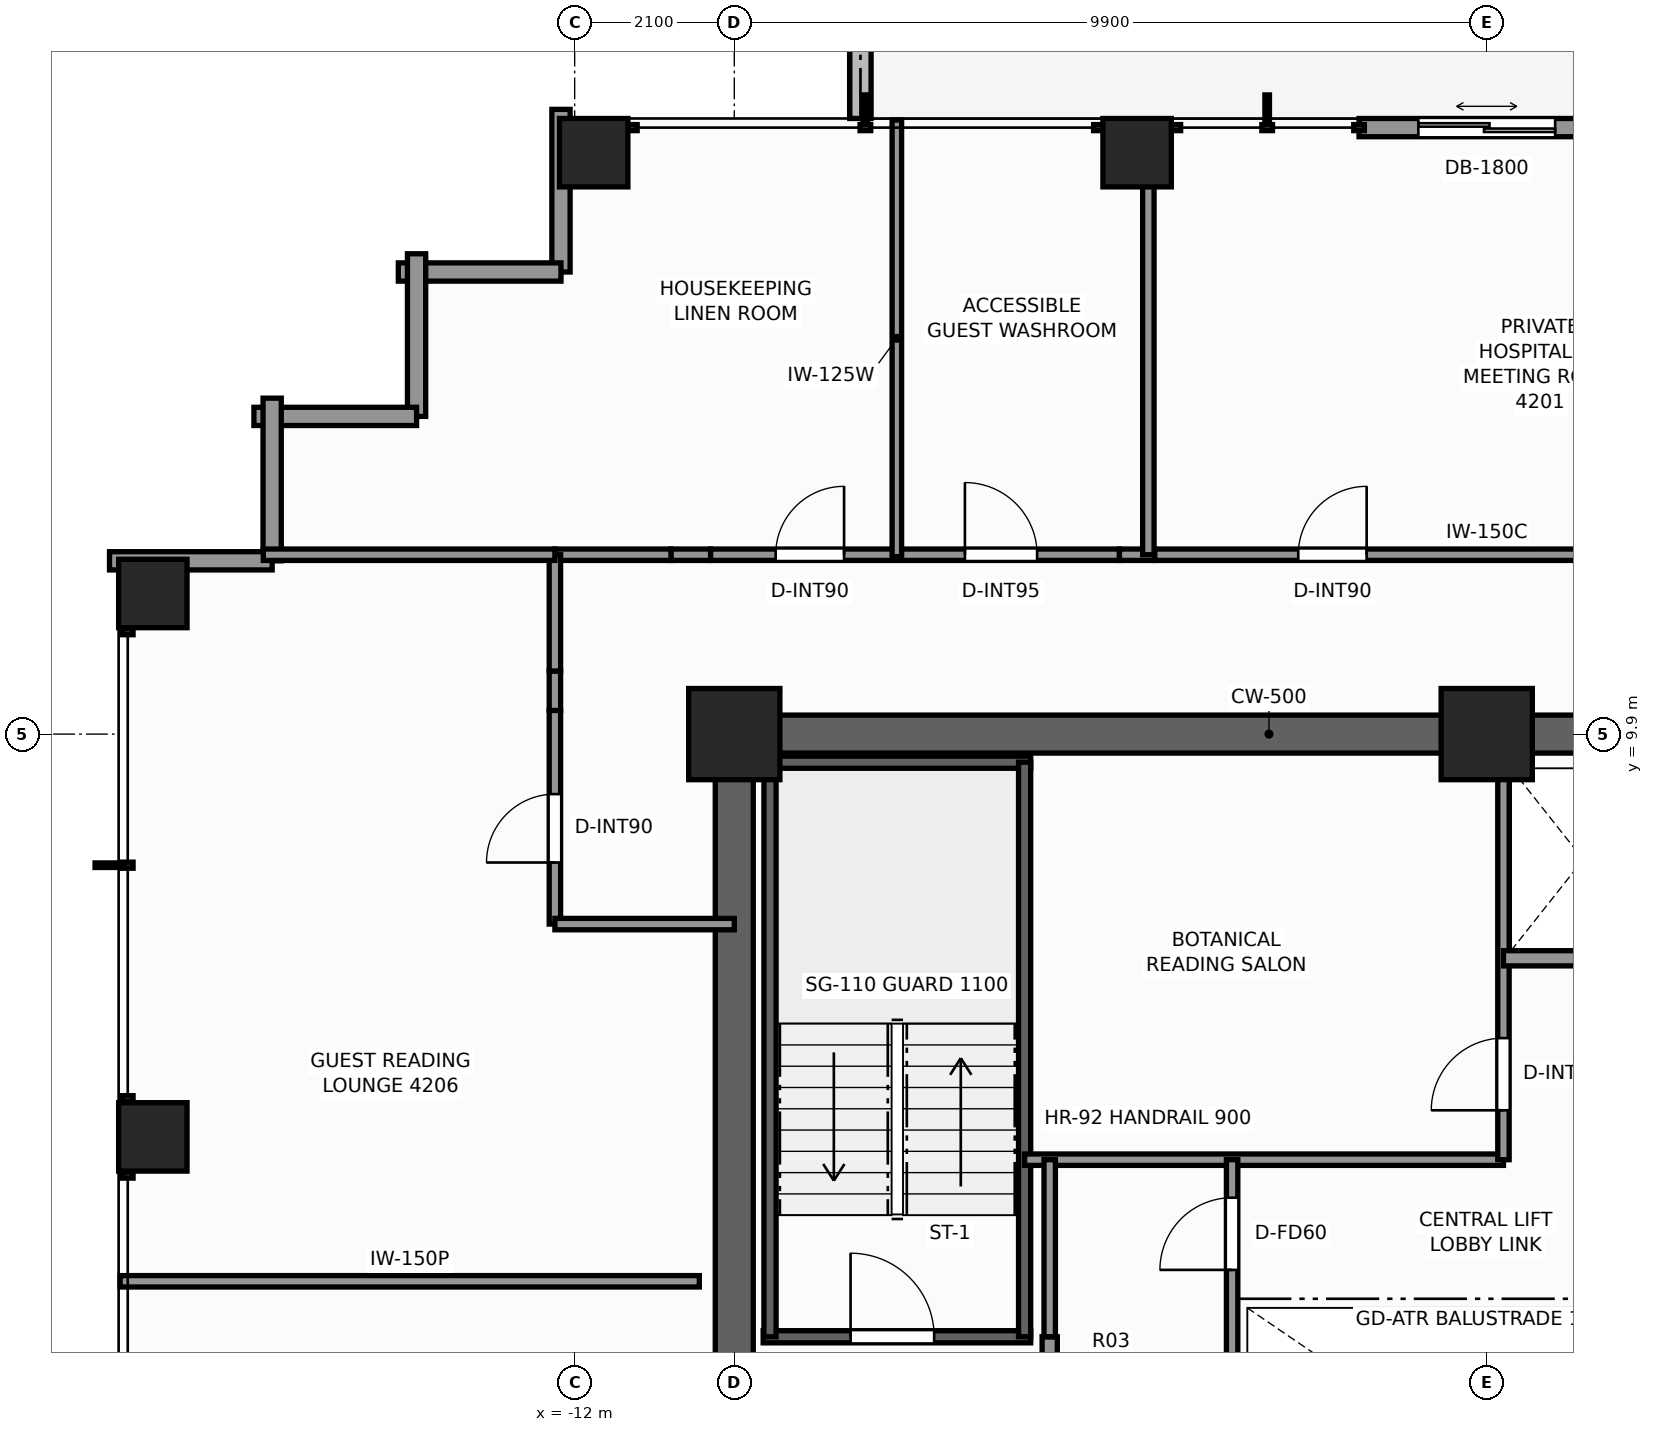
"""IFC4 building model, lengths in metres.
Left out: names, types, materials, properties, quantities, classifications, styles, units other than length and angle.
Written with IfcOpenShell. Run it as: python <this file> out.ifc"""

import sys

from ifc_helpers import new_model, si_unit, direction, frame, frame_2d, origin, origin_2d, place, context, subcontext, project, spatial, rectangle, extrude, element, fill, save


model = new_model("IFC4")
c1 = context("Model", 3, precision=1e-05, world=origin(), true_north=direction((0.0, 1.0)))
c2 = subcontext(c1, "Body", "Model", "MODEL_VIEW")
j1 = project(units=[si_unit("LENGTHUNIT", "METRE"), si_unit("PLANEANGLEUNIT", "RADIAN")], contexts=[c1])
p1 = place(None, origin())
s1 = spatial("IfcSite", under=j1, at=p1, CompositionType="ELEMENT")
p2 = place(p1, origin())
s2 = spatial("IfcBuilding", under=s1, at=p2, CompositionType="ELEMENT")
p3 = place(p2, frame((0.0, 0.0, 144.8)))
s3 = spatial("IfcBuildingStorey", under=s2, at=p3, CompositionType="ELEMENT", Elevation=144.8)
p4 = place(p3, frame((-10.15, 9.9, 0.0), z_axis=(0.0, 0.0, 1.0), x_axis=(1.0, 0.0, 0.0)))
e1 = element("IfcWall", 1, at=p4, inside=s3, PredefinedType="SHEAR", context=c2, shape_type="SweptSolid", body=[
    extrude(rectangle(XDim=14.57, YDim=0.5, at=frame_2d((7.285, 0.0))), origin(), (0.0, 0.0, 1.0), 3.3),
])
p5 = place(p3, frame((-9.9, -3.7, 0.0), z_axis=(0.0, 0.0, 1.0), x_axis=(0.0, 1.0, 0.0)))
e2 = element("IfcWall", 2, at=p5, inside=s3, PredefinedType="SHEAR", context=c2, shape_type="SweptSolid", body=[
    extrude(rectangle(XDim=13.35, YDim=0.5, at=frame_2d((6.675, 0.0))), origin(), (0.0, 0.0, 1.0), 3.3),
])
p6 = place(p5, frame((0.35, 0.0, 0.0)))
e3 = element("IfcOpeningElement", 3, at=p6, cuts=e2, PredefinedType="OPENING", context=c2, shape_type="SweptSolid", body=[
    extrude(rectangle(XDim=1.1, YDim=2.2, at=frame_2d((0.55, 1.1))), frame((0.0, 0.26, 0.0), z_axis=(0.0, -1.0, 0.0), x_axis=(1.0, 0.0, 0.0)), (0.0, 0.0, 1.0), 0.52),
])
for number, where, z_axis, x_axis in (
    (4, (-9.9, 9.9, 0.0), (0.0, 0.0, 1.0), (1.0, 0.0, 0.0)),
    (5, (0.0, 9.9, 0.0), (0.0, 0.0, 1.0), (1.0, 0.0, 0.0)),
):
    element("IfcColumn", number, at=place(p3, frame(where, z_axis=z_axis, x_axis=x_axis)), inside=s3, PredefinedType="COLUMN", context=c2, shape_type="SweptSolid", body=[
        extrude(rectangle(XDim=1.2, YDim=1.2, at=origin_2d()), origin(), (0.0, 0.0, 1.0), 3.3),
    ])
for number, where, z_axis, x_axis in (
    (6, (-11.75, 17.55, 0.0), (0.0, 0.0, 1.0), (1.0, 0.0, 0.0)),
    (7, (-4.6, 17.55, 0.0), (0.0, 0.0, 1.0), (1.0, 0.0, 0.0)),
    (8, (-17.55, 4.6, 0.0), (0.0, 0.0, 1.0), (1.0, 0.0, 0.0)),
    (9, (-17.55, 11.75, 0.0), (0.0, 0.0, 1.0), (1.0, 0.0, 0.0)),
):
    element("IfcColumn", number, at=place(p3, frame(where, z_axis=z_axis, x_axis=x_axis)), inside=s3, PredefinedType="COLUMN", context=c2, shape_type="SweptSolid", body=[
        extrude(rectangle(XDim=0.9, YDim=0.9, at=origin_2d()), origin(), (0.0, 0.0, 1.0), 3.3),
    ])
p7 = place(p3, frame((-8.24, 20.975, -0.02), z_axis=(0.0, 0.0, 1.0), x_axis=(0.0, -1.0, 0.0)))
e10 = element("IfcWall", 10, at=p7, inside=s3, PredefinedType="PARAPET", context=c2, shape_type="SweptSolid", body=[
    extrude(rectangle(XDim=2.975, YDim=0.28, at=frame_2d((1.487, 0.0))), origin(), (0.0, 0.0, 1.0), 0.42),
])
p8 = place(p3, frame((-1.68, 17.88, 0.0), z_axis=(0.0, 0.0, 1.0), x_axis=(1.0, 0.0, 0.0)))
e11 = element("IfcWall", 11, at=p8, inside=s3, PredefinedType="STANDARD", context=c2, shape_type="SweptSolid", body=[
    extrude(rectangle(XDim=3.36, YDim=0.24, at=frame_2d((1.68, 0.0))), origin(), (0.0, 0.0, 1.0), 2.95),
])
p9 = place(p8, frame((0.78, 0.0, 0.0)))
e12 = element("IfcOpeningElement", 12, at=p9, cuts=e11, PredefinedType="OPENING", context=c2, shape_type="SweptSolid", body=[
    extrude(rectangle(XDim=1.8, YDim=2.2, at=frame_2d((0.9, 1.1))), frame((0.0, 0.13, 0.0), z_axis=(0.0, -1.0, 0.0), x_axis=(1.0, 0.0, 0.0)), (0.0, 0.0, 1.0), 0.26),
])
for number, where, z_axis, x_axis in (
    (13, (-12.18, 15.98, 0.0), (0.0, 0.0, 1.0), (0.0, 1.0, 0.0)),
    (14, (-14.32, 15.98, 0.0), (0.0, 0.0, 1.0), (1.0, 0.0, 0.0)),
):
    element("IfcWall", number, at=place(p3, frame(where, z_axis=z_axis, x_axis=x_axis)), inside=s3, PredefinedType="STANDARD", context=c2, shape_type="SweptSolid", body=[
        extrude(rectangle(XDim=2.14, YDim=0.24, at=frame_2d((1.07, 0.0))), origin(), (0.0, 0.0, 1.0), 2.329),
    ])
for number, where, z_axis, x_axis in (
    (15, (-14.08, 14.08, 0.0), (0.0, 0.0, 1.0), (0.0, 1.0, 0.0)),
    (16, (-16.22, 14.08, 0.0), (0.0, 0.0, 1.0), (1.0, 0.0, 0.0)),
):
    element("IfcWall", number, at=place(p3, frame(where, z_axis=z_axis, x_axis=x_axis)), inside=s3, PredefinedType="STANDARD", context=c2, shape_type="SweptSolid", body=[
        extrude(rectangle(XDim=2.14, YDim=0.24, at=frame_2d((1.07, 0.0))), origin(), (0.0, 0.0, 1.0), 2.329),
    ])
for number, where, z_axis, x_axis in (
    (17, (-15.98, 12.18, 0.0), (0.0, 0.0, 1.0), (0.0, 1.0, 0.0)),
    (18, (-18.12, 12.18, 0.0), (0.0, 0.0, 1.0), (1.0, 0.0, 0.0)),
):
    element("IfcWall", number, at=place(p3, frame(where, z_axis=z_axis, x_axis=x_axis)), inside=s3, PredefinedType="STANDARD", context=c2, shape_type="SweptSolid", body=[
        extrude(rectangle(XDim=2.14, YDim=0.24, at=frame_2d((1.07, 0.0))), origin(), (0.0, 0.0, 1.0), 2.329),
    ])
p10 = place(p3, frame((-9.52, 1.97, 0.0), z_axis=(0.0, 0.0, 1.0), x_axis=(1.0, 0.0, 0.0)))
e19 = element("IfcWall", 19, at=p10, inside=s3, PredefinedType="SHEAR", context=c2, shape_type="SweptSolid", body=[
    extrude(rectangle(XDim=3.52, YDim=0.16, at=frame_2d((1.76, 0.0))), origin(), (0.0, 0.0, 1.0), 3.3),
])
p11 = place(p10, frame((1.15, 0.0, 0.0)))
e20 = element("IfcOpeningElement", 20, at=p11, cuts=e19, PredefinedType="OPENING", context=c2, shape_type="SweptSolid", body=[
    extrude(rectangle(XDim=1.1, YDim=2.2, at=frame_2d((0.55, 1.1))), frame((0.0, 0.09, 0.0), z_axis=(0.0, -1.0, 0.0), x_axis=(1.0, 0.0, 0.0)), (0.0, 0.0, 1.0), 0.18),
])
p12 = place(p3, frame((-9.52, 9.53, 0.0), z_axis=(0.0, 0.0, 1.0), x_axis=(1.0, 0.0, 0.0)))
e21 = element("IfcWall", 21, at=p12, inside=s3, PredefinedType="SHEAR", context=c2, shape_type="SweptSolid", body=[
    extrude(rectangle(XDim=3.52, YDim=0.16, at=frame_2d((1.76, 0.0))), origin(), (0.0, 0.0, 1.0), 3.3),
])
for number, where, z_axis, x_axis in (
    (22, (-9.43, 1.97, 0.0), (0.0, 0.0, 1.0), (0.0, 1.0, 0.0)),
    (23, (-6.08, 1.97, 0.0), (0.0, 0.0, 1.0), (0.0, 1.0, 0.0)),
):
    element("IfcWall", number, at=place(p3, frame(where, z_axis=z_axis, x_axis=x_axis)), inside=s3, PredefinedType="SHEAR", context=c2, shape_type="SweptSolid", body=[
        extrude(rectangle(XDim=7.56, YDim=0.16, at=frame_2d((3.78, 0.0))), origin(), (0.0, 0.0, 1.0), 3.3),
    ])
p13 = place(p3, frame((-5.75, -3.6, 0.0), z_axis=(0.0, 0.0, 1.0), x_axis=(0.0, 1.0, 0.0)))
e24 = element("IfcWall", 24, at=p13, inside=s3, PredefinedType="SOLIDWALL", context=c2, shape_type="SweptSolid", body=[
    extrude(rectangle(XDim=5.57, YDim=0.2, at=frame_2d((2.785, 0.0))), origin(), (0.0, 0.0, 1.0), 2.585),
])
p14 = place(p13, frame((2.75, 0.0, 0.0)))
e25 = element("IfcOpeningElement", 25, at=p14, cuts=e24, PredefinedType="OPENING", context=c2, shape_type="SweptSolid", body=[
    extrude(rectangle(XDim=1.1, YDim=2.2, at=frame_2d((0.55, 1.1))), frame((0.0, 0.11, 0.0), z_axis=(0.0, -1.0, 0.0), x_axis=(1.0, 0.0, 0.0)), (0.0, 0.0, 1.0), 0.22),
])
p15 = place(p3, frame((-6.08, 4.3, 0.0), z_axis=(0.0, 0.0, 1.0), x_axis=(1.0, 0.0, 0.0)))
e26 = element("IfcWall", 26, at=p15, inside=s3, PredefinedType="PARTITIONING", context=c2, shape_type="SweptSolid", body=[
    extrude(rectangle(XDim=6.3, YDim=0.15, at=frame_2d((3.15, 0.0))), origin(), (0.0, 0.0, 1.0), 2.95),
])
p16 = place(p3, frame((0.22, 4.3, 0.0), z_axis=(0.0, 0.0, 1.0), x_axis=(0.0, 1.0, 0.0)))
e27 = element("IfcWall", 27, at=p16, inside=s3, PredefinedType="PARTITIONING", context=c2, shape_type="SweptSolid", body=[
    extrude(rectangle(XDim=5.22, YDim=0.15, at=frame_2d((2.61, 0.0))), origin(), (0.0, 0.0, 1.0), 2.95),
])
p17 = place(p16, frame((0.65, 0.0, 0.0)))
e28 = element("IfcOpeningElement", 28, at=p17, cuts=e27, PredefinedType="OPENING", context=c2, shape_type="SweptSolid", body=[
    extrude(rectangle(XDim=0.95, YDim=2.06, at=frame_2d((0.475, 1.03))), frame((0.0, 0.085, 0.0), z_axis=(0.0, -1.0, 0.0), x_axis=(1.0, 0.0, 0.0)), (0.0, 0.0, 1.0), 0.17),
])
p18 = place(p3, frame((0.22, 6.95, 0.0), z_axis=(0.0, 0.0, 1.0), x_axis=(1.0, 0.0, 0.0)))
e29 = element("IfcWall", 29, at=p18, inside=s3, PredefinedType="SOLIDWALL", context=c2, shape_type="SweptSolid", body=[
    extrude(rectangle(XDim=4.18, YDim=0.2, at=frame_2d((2.09, 0.0))), origin(), (0.0, 0.0, 1.0), 2.95),
])
p19 = place(p3, frame((-3.35, 1.1, 0.0), z_axis=(0.0, 0.0, 1.0), x_axis=(0.0, 1.0, 0.0)))
e30 = element("IfcWall", 30, at=p19, inside=s3, PredefinedType="PARTITIONING", context=c2, shape_type="SweptSolid", body=[
    extrude(rectangle(XDim=3.2, YDim=0.15, at=frame_2d((1.6, 0.0))), origin(), (0.0, 0.0, 1.0), 2.585),
])
p20 = place(p19, frame((1.75, 0.0, 0.0)))
e31 = element("IfcOpeningElement", 31, at=p20, cuts=e30, PredefinedType="OPENING", context=c2, shape_type="SweptSolid", body=[
    extrude(rectangle(XDim=0.95, YDim=2.06, at=frame_2d((0.475, 1.03))), frame((0.0, 0.085, 0.0), z_axis=(0.0, -1.0, 0.0), x_axis=(1.0, 0.0, 0.0)), (0.0, 0.0, 1.0), 0.17),
])
p21 = place(p3, frame((-5.75, 1.97, 0.0), z_axis=(0.0, 0.0, 1.0), x_axis=(0.0, 1.0, 0.0)))
e32 = element("IfcWall", 32, at=p21, inside=s3, PredefinedType="PARTITIONING", context=c2, shape_type="SweptSolid", body=[
    extrude(rectangle(XDim=2.33, YDim=0.15, at=frame_2d((1.165, 0.0))), origin(), (0.0, 0.0, 1.0), 2.585),
])
p22 = place(p3, frame((-12.26, 12.26, 0.0), z_axis=(0.0, 0.0, 1.0), x_axis=(1.0, 0.0, 0.0)))
e33 = element("IfcWall", 33, at=p22, inside=s3, PredefinedType="PARTITIONING", context=c2, shape_type="SweptSolid", body=[
    extrude(rectangle(XDim=1.53, YDim=0.15, at=frame_2d((0.765, 0.0))), origin(), (0.0, 0.0, 1.0), 2.95),
])
p23 = place(p3, frame((-10.73, 12.26, 0.0), z_axis=(0.0, 0.0, 1.0), x_axis=(1.0, 0.0, 0.0)))
e34 = element("IfcWall", 34, at=p23, inside=s3, PredefinedType="PARTITIONING", context=c2, shape_type="SweptSolid", body=[
    extrude(rectangle(XDim=0.519, YDim=0.15, at=frame_2d((0.259, 0.0))), origin(), (0.0, 0.0, 1.0), 2.162),
])
p24 = place(p3, frame((-10.211, 12.26, 0.0), z_axis=(0.0, 0.0, 1.0), x_axis=(1.0, 0.0, 0.0)))
e35 = element("IfcWall", 35, at=p24, inside=s3, PredefinedType="PARTITIONING", context=c2, shape_type="SweptSolid", body=[
    extrude(rectangle(XDim=5.379, YDim=0.15, at=frame_2d((2.689, 0.0))), origin(), (0.0, 0.0, 1.0), 2.95),
])
p25 = place(p24, frame((0.856, 0.0, 0.0)))
e36 = element("IfcOpeningElement", 36, at=p25, cuts=e35, PredefinedType="OPENING", context=c2, shape_type="SweptSolid", body=[
    extrude(rectangle(XDim=0.9, YDim=2.06, at=frame_2d((0.45, 1.03))), frame((0.0, 0.085, 0.0), z_axis=(0.0, -1.0, 0.0), x_axis=(1.0, 0.0, 0.0)), (0.0, 0.0, 1.0), 0.17),
])
p26 = place(p24, frame((3.346, 0.0, 0.0)))
e37 = element("IfcOpeningElement", 37, at=p26, cuts=e35, PredefinedType="OPENING", context=c2, shape_type="SweptSolid", body=[
    extrude(rectangle(XDim=0.95, YDim=2.06, at=frame_2d((0.475, 1.03))), frame((0.0, 0.085, 0.0), z_axis=(0.0, -1.0, 0.0), x_axis=(1.0, 0.0, 0.0)), (0.0, 0.0, 1.0), 0.17),
])
p27 = place(p3, frame((-4.833, 12.26, 0.0), z_axis=(0.0, 0.0, 1.0), x_axis=(1.0, 0.0, 0.0)))
e38 = element("IfcWall", 38, at=p27, inside=s3, PredefinedType="PARTITIONING", context=c2, shape_type="SweptSolid", body=[
    extrude(rectangle(XDim=0.465, YDim=0.15, at=frame_2d((0.232, 0.0))), origin(), (0.0, 0.0, 1.0), 2.162),
])
p28 = place(p3, frame((-4.367, 12.26, 0.0), z_axis=(0.0, 0.0, 1.0), x_axis=(1.0, 0.0, 0.0)))
e39 = element("IfcWall", 39, at=p28, inside=s3, PredefinedType="PARTITIONING", context=c2, shape_type="SweptSolid", body=[
    extrude(rectangle(XDim=8.735, YDim=0.15, at=frame_2d((4.367, 0.0))), origin(), (0.0, 0.0, 1.0), 2.475),
])
p29 = place(p28, frame((1.887, 0.0, 0.0)))
e40 = element("IfcOpeningElement", 40, at=p29, cuts=e39, PredefinedType="OPENING", context=c2, shape_type="SweptSolid", body=[
    extrude(rectangle(XDim=0.9, YDim=2.06, at=frame_2d((0.45, 1.03))), frame((0.0, 0.085, 0.0), z_axis=(0.0, -1.0, 0.0), x_axis=(1.0, 0.0, 0.0)), (0.0, 0.0, 1.0), 0.17),
])
p30 = place(p3, frame((-12.26, 7.4, 0.0), z_axis=(0.0, 0.0, 1.0), x_axis=(0.0, 1.0, 0.0)))
e41 = element("IfcWall", 41, at=p30, inside=s3, PredefinedType="PARTITIONING", context=c2, shape_type="SweptSolid", body=[
    extrude(rectangle(XDim=2.812, YDim=0.15, at=frame_2d((1.406, 0.0))), origin(), (0.0, 0.0, 1.0), 2.95),
])
p31 = place(p30, frame((0.81, 0.0, 0.0)))
e42 = element("IfcOpeningElement", 42, at=p31, cuts=e41, PredefinedType="OPENING", context=c2, shape_type="SweptSolid", body=[
    extrude(rectangle(XDim=0.9, YDim=2.06, at=frame_2d((0.45, 1.03))), frame((0.0, 0.085, 0.0), z_axis=(0.0, -1.0, 0.0), x_axis=(1.0, 0.0, 0.0)), (0.0, 0.0, 1.0), 0.17),
])
p32 = place(p3, frame((-12.26, 10.211, 0.0), z_axis=(0.0, 0.0, 1.0), x_axis=(0.0, 1.0, 0.0)))
e43 = element("IfcWall", 43, at=p32, inside=s3, PredefinedType="PARTITIONING", context=c2, shape_type="SweptSolid", body=[
    extrude(rectangle(XDim=0.519, YDim=0.15, at=frame_2d((0.259, 0.0))), origin(), (0.0, 0.0, 1.0), 2.162),
])
p33 = place(p3, frame((-12.26, 10.73, 0.0), z_axis=(0.0, 0.0, 1.0), x_axis=(0.0, 1.0, 0.0)))
e44 = element("IfcWall", 44, at=p33, inside=s3, PredefinedType="PARTITIONING", context=c2, shape_type="SweptSolid", body=[
    extrude(rectangle(XDim=1.53, YDim=0.15, at=frame_2d((0.765, 0.0))), origin(), (0.0, 0.0, 1.0), 2.95),
])
p34 = place(p3, frame((-12.26, 7.4, 0.0), z_axis=(0.0, 0.0, 1.0), x_axis=(1.0, 0.0, 0.0)))
e45 = element("IfcWall", 45, at=p34, inside=s3, PredefinedType="PARTITIONING", context=c2, shape_type="SweptSolid", body=[
    extrude(rectangle(XDim=2.36, YDim=0.15, at=frame_2d((1.18, 0.0))), origin(), (0.0, 0.0, 1.0), 2.95),
])
p35 = place(p3, frame((-16.096, 12.26, 0.0), z_axis=(0.0, 0.0, 1.0), x_axis=(1.0, 0.0, 0.0)))
e46 = element("IfcWall", 46, at=p35, inside=s3, PredefinedType="PARTITIONING", context=c2, shape_type="SweptSolid", body=[
    extrude(rectangle(XDim=3.836, YDim=0.15, at=frame_2d((1.918, 0.0))), origin(), (0.0, 0.0, 1.0), 2.95),
])
p36 = place(p3, frame((-4.452, 12.26, 0.0), z_axis=(0.0, 0.0, 1.0), x_axis=(0.0, 1.0, 0.0)))
e47 = element("IfcWall", 47, at=p36, inside=s3, PredefinedType="PARTITIONING", context=c2, shape_type="SweptSolid", body=[
    extrude(rectangle(XDim=5.117, YDim=0.15, at=frame_2d((2.559, 0.0))), origin(), (0.0, 0.0, 1.0), 2.162),
])
p37 = place(p3, frame((-4.452, 17.377, 0.0), z_axis=(0.0, 0.0, 1.0), x_axis=(0.0, 1.0, 0.0)))
e48 = element("IfcWall", 48, at=p37, inside=s3, PredefinedType="PARTITIONING", context=c2, shape_type="SweptSolid", body=[
    extrude(rectangle(XDim=0.603, YDim=0.15, at=frame_2d((0.301, 0.0))), origin(), (0.0, 0.0, 1.0), 2.319),
])
p38 = place(p3, frame((-7.761, 12.235, 0.0), z_axis=(0.0, 0.0, 1.0), x_axis=(0.0, 1.0, 0.0)))
e49 = element("IfcWall", 49, at=p38, inside=s3, PredefinedType="PARTITIONING", context=c2, shape_type="SweptSolid", body=[
    extrude(rectangle(XDim=5.745, YDim=0.125, at=frame_2d((2.873, 0.0))), origin(), (0.0, 0.0, 1.0), 2.319),
])
p39 = place(p3, frame((-17.98, 2.7, 0.0), z_axis=(0.0, 0.0, 1.0), x_axis=(1.0, 0.0, 0.0)))
e50 = element("IfcWall", 50, at=p39, inside=s3, PredefinedType="PARTITIONING", context=c2, shape_type="SweptSolid", body=[
    extrude(rectangle(XDim=7.62, YDim=0.15, at=frame_2d((3.81, 0.0))), origin(), (0.0, 0.0, 1.0), 2.319),
])
p40 = place(p9, origin())
e51 = element("IfcDoor", 51, at=p40, inside=s3, OperationType="DOUBLE_DOOR_SLIDING", PredefinedType="DOOR", context=c2, shape_type="SweptSolid", body=[
    extrude(rectangle(XDim=1.8, YDim=2.2, at=frame_2d((0.9, 1.1))), frame((0.0, 0.025, 0.0), z_axis=(0.0, -1.0, 0.0), x_axis=(1.0, 0.0, 0.0)), (0.0, 0.0, 1.0), 0.05),
])
fill(e12, e51)
p41 = place(p11, origin())
e52 = element("IfcDoor", 52, at=p41, inside=s3, OperationType="SINGLE_SWING_LEFT", PredefinedType="DOOR", context=c2, shape_type="SweptSolid", body=[
    extrude(rectangle(XDim=1.1, YDim=2.2, at=frame_2d((0.55, 1.1))), frame((0.0, 0.025, 0.0), z_axis=(0.0, -1.0, 0.0), x_axis=(1.0, 0.0, 0.0)), (0.0, 0.0, 1.0), 0.05),
])
fill(e20, e52)
p42 = place(p17, origin())
e53 = element("IfcDoor", 53, at=p42, inside=s3, OperationType="SINGLE_SWING_LEFT", PredefinedType="DOOR", context=c2, shape_type="SweptSolid", body=[
    extrude(rectangle(XDim=0.95, YDim=2.06, at=frame_2d((0.475, 1.03))), frame((0.0, 0.025, 0.0), z_axis=(0.0, -1.0, 0.0), x_axis=(1.0, 0.0, 0.0)), (0.0, 0.0, 1.0), 0.05),
])
fill(e28, e53)
p43 = place(p20, origin())
e54 = element("IfcDoor", 54, at=p43, inside=s3, OperationType="SINGLE_SWING_LEFT", PredefinedType="DOOR", context=c2, shape_type="SweptSolid", body=[
    extrude(rectangle(XDim=0.95, YDim=2.06, at=frame_2d((0.475, 1.03))), frame((0.0, 0.025, 0.0), z_axis=(0.0, -1.0, 0.0), x_axis=(1.0, 0.0, 0.0)), (0.0, 0.0, 1.0), 0.05),
])
fill(e31, e54)
p44 = place(p25, origin())
e55 = element("IfcDoor", 55, at=p44, inside=s3, OperationType="SINGLE_SWING_RIGHT", PredefinedType="DOOR", context=c2, shape_type="SweptSolid", body=[
    extrude(rectangle(XDim=0.9, YDim=2.06, at=frame_2d((0.45, 1.03))), frame((0.0, 0.025, 0.0), z_axis=(0.0, -1.0, 0.0), x_axis=(1.0, 0.0, 0.0)), (0.0, 0.0, 1.0), 0.05),
])
fill(e36, e55)
p45 = place(p26, origin())
e56 = element("IfcDoor", 56, at=p45, inside=s3, OperationType="SINGLE_SWING_LEFT", PredefinedType="DOOR", context=c2, shape_type="SweptSolid", body=[
    extrude(rectangle(XDim=0.95, YDim=2.06, at=frame_2d((0.475, 1.03))), frame((0.0, 0.025, 0.0), z_axis=(0.0, -1.0, 0.0), x_axis=(1.0, 0.0, 0.0)), (0.0, 0.0, 1.0), 0.05),
])
fill(e37, e56)
p46 = place(p29, origin())
e57 = element("IfcDoor", 57, at=p46, inside=s3, OperationType="SINGLE_SWING_RIGHT", PredefinedType="DOOR", context=c2, shape_type="SweptSolid", body=[
    extrude(rectangle(XDim=0.9, YDim=2.06, at=frame_2d((0.45, 1.03))), frame((0.0, 0.025, 0.0), z_axis=(0.0, -1.0, 0.0), x_axis=(1.0, 0.0, 0.0)), (0.0, 0.0, 1.0), 0.05),
])
fill(e40, e57)
p47 = place(p31, origin())
e58 = element("IfcDoor", 58, at=p47, inside=s3, OperationType="SINGLE_SWING_LEFT", PredefinedType="DOOR", context=c2, shape_type="SweptSolid", body=[
    extrude(rectangle(XDim=0.9, YDim=2.06, at=frame_2d((0.45, 1.03))), frame((0.0, 0.025, 0.0), z_axis=(0.0, -1.0, 0.0), x_axis=(1.0, 0.0, 0.0)), (0.0, 0.0, 1.0), 0.05),
])
fill(e42, e58)
save(model, sys.argv[1])
